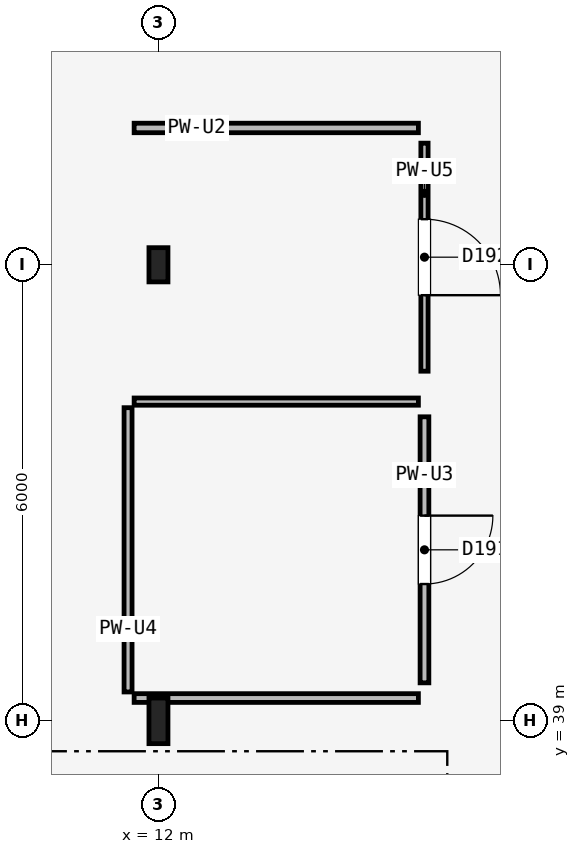
"""IFC4 building model, lengths in metres.
Left out: names, types, materials, properties, quantities, classifications, styles, units other than length and angle.
Written with IfcOpenShell. Run it as: python <this file> out.ifc"""

import sys

from ifc_helpers import new_model, si_unit, direction, frame, frame_2d, origin, origin_2d, place, context, subcontext, project, spatial, rectangle, i_section, extrude, element, fill, save


model = new_model("IFC4")
c1 = context("Model", 3, precision=1e-05, world=origin(), true_north=direction((0.0, 1.0)))
c2 = subcontext(c1, "Body", "Model", "MODEL_VIEW")
j1 = project(units=[si_unit("LENGTHUNIT", "METRE"), si_unit("PLANEANGLEUNIT", "RADIAN")], contexts=[c1])
p1 = place(None, origin())
s1 = spatial("IfcSite", under=j1, at=p1, CompositionType="ELEMENT")
p2 = place(p1, origin())
s2 = spatial("IfcBuilding", under=s1, at=p2, CompositionType="ELEMENT")
p3 = place(p2, frame((0.0, 0.0, 4.8)))
s3 = spatial("IfcBuildingStorey", under=s2, at=p3, CompositionType="ELEMENT", Elevation=4.8)
p4 = place(p3, frame((12.0, 39.0, 0.0), z_axis=(0.0, 0.0, 1.0), x_axis=(1.0, 0.0, 0.0)))
e1 = element("IfcColumn", 1, at=p4, inside=s3, PredefinedType="COLUMN", context=c2, shape_type="SweptSolid", body=[
    extrude(i_section(OverallWidth=0.25, OverallDepth=0.6, WebThickness=0.012, FlangeThickness=0.024, FilletRadius=0.017, at=origin_2d()), origin(), (0.0, 0.0, 1.0), 4.5),
])
p5 = place(p3, frame((12.0, 45.0, 0.0), z_axis=(0.0, 0.0, 1.0), x_axis=(1.0, 0.0, 0.0)))
e2 = element("IfcColumn", 2, at=p5, inside=s3, PredefinedType="COLUMN", context=c2, shape_type="SweptSolid", body=[
    extrude(i_section(OverallWidth=0.25, OverallDepth=0.45, WebThickness=0.011, FlangeThickness=0.014, FilletRadius=0.015, at=origin_2d()), origin(), (0.0, 0.0, 1.0), 4.5),
])
p6 = place(p3, frame((15.5, 43.0, 0.0), z_axis=(0.0, 0.0, 1.0), x_axis=(0.0, -1.0, 0.0)))
e3 = element("IfcWall", 3, at=p6, inside=s3, PredefinedType="PARTITIONING", context=c2, shape_type="SweptSolid", body=[
    extrude(rectangle(XDim=3.5, YDim=0.115, at=frame_2d((1.75, 0.0))), origin(), (0.0, 0.0, 1.0), 4.19),
])
p7 = place(p6, frame((1.3, 0.0, 0.0)))
e4 = element("IfcOpeningElement", 4, at=p7, cuts=e3, PredefinedType="OPENING", context=c2, shape_type="SweptSolid", body=[
    extrude(rectangle(XDim=0.9, YDim=2.1, at=frame_2d((0.45, 1.05))), frame((0.0, 0.067, 0.0), z_axis=(0.0, -1.0, 0.0), x_axis=(1.0, 0.0, 0.0)), (0.0, 0.0, 1.0), 0.135),
])
p8 = place(p3, frame((15.5, 46.6, 0.0), z_axis=(0.0, 0.0, 1.0), x_axis=(0.0, -1.0, 0.0)))
e5 = element("IfcWall", 5, at=p8, inside=s3, PredefinedType="PARTITIONING", context=c2, shape_type="SweptSolid", body=[
    extrude(rectangle(XDim=3.0, YDim=0.095, at=frame_2d((1.5, 0.0))), origin(), (0.0, 0.0, 1.0), 3.74),
])
p9 = place(p8, frame((1.0, 0.0, 0.0)))
e6 = element("IfcOpeningElement", 6, at=p9, cuts=e5, PredefinedType="OPENING", context=c2, shape_type="SweptSolid", body=[
    extrude(rectangle(XDim=1.0, YDim=2.1, at=frame_2d((0.5, 1.05))), frame((0.0, 0.057, 0.0), z_axis=(0.0, -1.0, 0.0), x_axis=(1.0, 0.0, 0.0)), (0.0, 0.0, 1.0), 0.115),
])
p10 = place(p3, frame((15.42, 39.3, 0.0), z_axis=(0.0, 0.0, 1.0), x_axis=(-1.0, 0.0, 0.0)))
e7 = element("IfcWall", 7, at=p10, inside=s3, PredefinedType="PARTITIONING", context=c2, shape_type="SweptSolid", body=[
    extrude(rectangle(XDim=3.74, YDim=0.115, at=frame_2d((1.87, 0.0))), origin(), (0.0, 0.0, 1.0), 3.783),
])
p11 = place(p3, frame((11.6, 39.38, 0.0), z_axis=(0.0, 0.0, 1.0), x_axis=(0.0, 1.0, 0.0)))
e8 = element("IfcWall", 8, at=p11, inside=s3, PredefinedType="PARTITIONING", context=c2, shape_type="SweptSolid", body=[
    extrude(rectangle(XDim=3.74, YDim=0.105, at=frame_2d((1.87, 0.0))), origin(), (0.0, 0.0, 1.0), 4.19),
])
p12 = place(p3, frame((11.68, 43.2, 0.0), z_axis=(0.0, 0.0, 1.0), x_axis=(1.0, 0.0, 0.0)))
e9 = element("IfcWall", 9, at=p12, inside=s3, PredefinedType="PARTITIONING", context=c2, shape_type="SweptSolid", body=[
    extrude(rectangle(XDim=3.74, YDim=0.095, at=frame_2d((1.87, 0.0))), origin(), (0.0, 0.0, 1.0), 3.783),
])
p13 = place(p3, frame((11.68, 46.8, 0.0), z_axis=(0.0, 0.0, 1.0), x_axis=(1.0, 0.0, 0.0)))
e10 = element("IfcWall", 10, at=p13, inside=s3, PredefinedType="PARTITIONING", context=c2, shape_type="SweptSolid", body=[
    extrude(rectangle(XDim=3.74, YDim=0.125, at=frame_2d((1.87, 0.0))), origin(), (0.0, 0.0, 1.0), 3.866),
])
p14 = place(p7, origin())
e11 = element("IfcDoor", 11, at=p14, inside=s3, OperationType="SINGLE_SWING_LEFT", PredefinedType="DOOR", context=c2, shape_type="SweptSolid", body=[
    extrude(rectangle(XDim=0.9, YDim=2.1, at=frame_2d((0.45, 1.05))), frame((0.0, 0.025, 0.0), z_axis=(0.0, -1.0, 0.0), x_axis=(1.0, 0.0, 0.0)), (0.0, 0.0, 1.0), 0.05),
])
fill(e4, e11)
p15 = place(p9, origin())
e12 = element("IfcDoor", 12, at=p15, inside=s3, OperationType="SINGLE_SWING_RIGHT", PredefinedType="DOOR", context=c2, shape_type="SweptSolid", body=[
    extrude(rectangle(XDim=1.0, YDim=2.1, at=frame_2d((0.5, 1.05))), frame((0.0, 0.025, 0.0), z_axis=(0.0, -1.0, 0.0), x_axis=(1.0, 0.0, 0.0)), (0.0, 0.0, 1.0), 0.05),
])
fill(e6, e12)
save(model, sys.argv[1])
